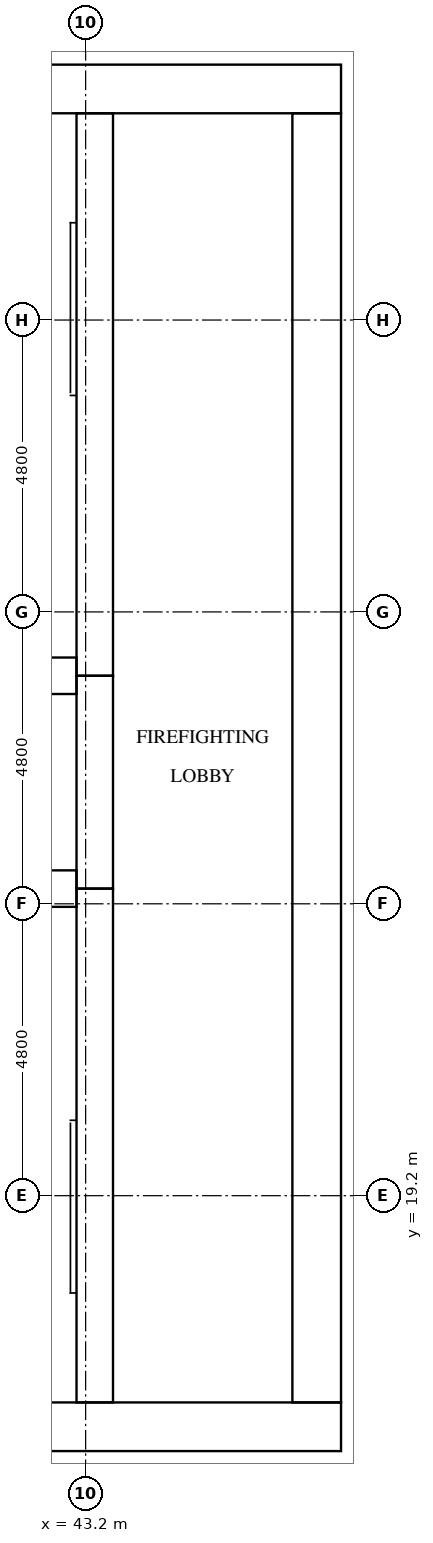
"""IFC4 building model, lengths in metres.
Left out: names, types, materials, properties, quantities, classifications, styles, units other than length and angle.
Written with IfcOpenShell. Run it as: python <this file> out.ifc"""

import sys

from ifc_helpers import new_model, si_unit, direction, frame, frame_2d, origin, place, context, subcontext, project, spatial, rectangle, extrude, element, fill, save


model = new_model("IFC4")
c1 = context("Model", 3, precision=1e-05, world=origin(), true_north=direction((0.0, 1.0)))
c2 = subcontext(c1, "Body", "Model", "MODEL_VIEW")
j1 = project(units=[si_unit("LENGTHUNIT", "METRE"), si_unit("PLANEANGLEUNIT", "RADIAN")], contexts=[c1])
p1 = place(None, origin())
s1 = spatial("IfcSite", under=j1, at=p1, CompositionType="ELEMENT")
p2 = place(p1, origin())
s2 = spatial("IfcBuilding", under=s1, at=p2, CompositionType="ELEMENT")
p3 = place(p2, frame((0.0, 0.0, 133.1)))
s3 = spatial("IfcBuildingStorey", under=s2, at=p3, CompositionType="ELEMENT", Elevation=133.1)
p4 = place(p3, frame((15.0, 15.4, 0.0), z_axis=(0.0, 0.0, 1.0), x_axis=(1.0, 0.0, 0.0)))
e1 = element("IfcWall", 1, at=p4, inside=s3, PredefinedType="SHEAR", context=c2, shape_type="SweptSolid", body=[
    extrude(rectangle(XDim=32.4, YDim=0.8, at=frame_2d((16.2, 0.0))), origin(), (0.0, 0.0, 1.0), 3.2),
])
p5 = place(p4, frame((15.3, 0.0, 0.0)))
e2 = element("IfcOpeningElement", 2, at=p5, cuts=e1, PredefinedType="OPENING", context=c2, shape_type="SweptSolid", body=[
    extrude(rectangle(XDim=1.8, YDim=2.1, at=frame_2d((0.9, 1.05))), frame((0.0, 0.41, 0.0), z_axis=(0.0, -1.0, 0.0), x_axis=(1.0, 0.0, 0.0)), (0.0, 0.0, 1.0), 0.82),
])
p6 = place(p3, frame((15.0, 37.4, 0.0), z_axis=(0.0, 0.0, 1.0), x_axis=(1.0, 0.0, 0.0)))
e3 = element("IfcWall", 3, at=p6, inside=s3, PredefinedType="SHEAR", context=c2, shape_type="SweptSolid", body=[
    extrude(rectangle(XDim=32.4, YDim=0.8, at=frame_2d((16.2, 0.0))), origin(), (0.0, 0.0, 1.0), 3.2),
])
p7 = place(p6, frame((15.3, 0.0, 0.0)))
e4 = element("IfcOpeningElement", 4, at=p7, cuts=e3, PredefinedType="OPENING", context=c2, shape_type="SweptSolid", body=[
    extrude(rectangle(XDim=1.8, YDim=2.1, at=frame_2d((0.9, 1.05))), frame((0.0, 0.41, 0.0), z_axis=(0.0, -1.0, 0.0), x_axis=(1.0, 0.0, 0.0)), (0.0, 0.0, 1.0), 0.82),
])
p8 = place(p6, frame((1.51, 0.0, 0.0)))
e5 = element("IfcOpeningElement", 5, at=p8, cuts=e3, PredefinedType="OPENING", context=c2, shape_type="SweptSolid", body=[
    extrude(rectangle(XDim=1.0, YDim=2.1, at=frame_2d((0.5, 1.05))), frame((0.0, 0.41, 0.0), z_axis=(0.0, -1.0, 0.0), x_axis=(1.0, 0.0, 0.0)), (0.0, 0.0, 1.0), 0.82),
])
p9 = place(p6, frame((5.11, 0.0, 0.0)))
e6 = element("IfcOpeningElement", 6, at=p9, cuts=e3, PredefinedType="OPENING", context=c2, shape_type="SweptSolid", body=[
    extrude(rectangle(XDim=1.0, YDim=2.1, at=frame_2d((0.5, 1.05))), frame((0.0, 0.41, 0.0), z_axis=(0.0, -1.0, 0.0), x_axis=(1.0, 0.0, 0.0)), (0.0, 0.0, 1.0), 0.82),
])
p10 = place(p3, frame((47.0, 15.8, 0.0), z_axis=(0.0, 0.0, 1.0), x_axis=(0.0, 1.0, 0.0)))
e7 = element("IfcWall", 7, at=p10, inside=s3, PredefinedType="SHEAR", context=c2, shape_type="SweptSolid", body=[
    extrude(rectangle(XDim=21.2, YDim=0.8, at=frame_2d((10.6, 0.0))), origin(), (0.0, 0.0, 1.0), 3.2),
])
p11 = place(p10, frame((10.3, 0.0, 0.0)))
e8 = element("IfcOpeningElement", 8, at=p11, cuts=e7, PredefinedType="OPENING", context=c2, shape_type="SweptSolid", body=[
    extrude(rectangle(XDim=1.2, YDim=2.1, at=frame_2d((0.6, 1.05))), frame((0.0, 0.41, 0.0), z_axis=(0.0, -1.0, 0.0), x_axis=(1.0, 0.0, 0.0)), (0.0, 0.0, 1.0), 0.82),
])
p12 = place(p3, frame((43.35, 15.8, 0.0), z_axis=(0.0, 0.0, 1.0), x_axis=(0.0, 1.0, 0.0)))
e9 = element("IfcWall", 9, at=p12, inside=s3, PredefinedType="SHEAR", context=c2, shape_type="SweptSolid", body=[
    extrude(rectangle(XDim=8.45, YDim=0.6, at=frame_2d((4.225, 0.0))), origin(), (0.0, 0.0, 1.0), 3.2),
])
p13 = place(p12, frame((0.4, 0.0, 0.0)))
e10 = element("IfcOpeningElement", 10, at=p13, cuts=e9, PredefinedType="OPENING", context=c2, shape_type="SweptSolid", body=[
    extrude(rectangle(XDim=1.2, YDim=2.1, at=frame_2d((0.6, 1.05))), frame((0.0, 0.31, 0.0), z_axis=(0.0, -1.0, 0.0), x_axis=(1.0, 0.0, 0.0)), (0.0, 0.0, 1.0), 0.62),
])
p14 = place(p3, frame((43.35, 24.25, 0.0), z_axis=(0.0, 0.0, 1.0), x_axis=(0.0, 1.0, 0.0)))
e11 = element("IfcWall", 11, at=p14, inside=s3, PredefinedType="SHEAR", context=c2, shape_type="SweptSolid", body=[
    extrude(rectangle(XDim=3.5, YDim=0.6, at=frame_2d((1.75, 0.0))), origin(), (0.0, 0.0, 1.0), 3.2),
])
p15 = place(p14, frame((1.2, 0.0, 0.0)))
e12 = element("IfcOpeningElement", 12, at=p15, cuts=e11, PredefinedType="OPENING", context=c2, shape_type="SweptSolid", body=[
    extrude(rectangle(XDim=1.1, YDim=2.1, at=frame_2d((0.55, 1.05))), frame((0.0, 0.31, 0.0), z_axis=(0.0, -1.0, 0.0), x_axis=(1.0, 0.0, 0.0)), (0.0, 0.0, 1.0), 0.62),
])
p16 = place(p3, frame((43.35, 27.75, 0.0), z_axis=(0.0, 0.0, 1.0), x_axis=(0.0, 1.0, 0.0)))
e13 = element("IfcWall", 13, at=p16, inside=s3, PredefinedType="SHEAR", context=c2, shape_type="SweptSolid", body=[
    extrude(rectangle(XDim=9.25, YDim=0.6, at=frame_2d((4.625, 0.0))), origin(), (0.0, 0.0, 1.0), 3.2),
])
p17 = place(p16, frame((7.65, 0.0, 0.0)))
e14 = element("IfcOpeningElement", 14, at=p17, cuts=e13, PredefinedType="OPENING", context=c2, shape_type="SweptSolid", body=[
    extrude(rectangle(XDim=1.2, YDim=2.1, at=frame_2d((0.6, 1.05))), frame((0.0, 0.31, 0.0), z_axis=(0.0, -1.0, 0.0), x_axis=(1.0, 0.0, 0.0)), (0.0, 0.0, 1.0), 0.62),
])
for number, where, z_axis, x_axis in (
    (15, (39.6, 24.25, 0.0), (0.0, 0.0, 1.0), (1.0, 0.0, 0.0)),
    (16, (39.6, 27.75, 0.0), (0.0, 0.0, 1.0), (1.0, 0.0, 0.0)),
):
    element("IfcWall", number, at=place(p3, frame(where, z_axis=z_axis, x_axis=x_axis)), inside=s3, PredefinedType="SHEAR", context=c2, shape_type="SweptSolid", body=[
        extrude(rectangle(XDim=3.45, YDim=0.6, at=frame_2d((1.725, 0.0))), origin(), (0.0, 0.0, 1.0), 3.2),
    ])
p18 = place(p15, origin())
e17 = element("IfcDoor", 17, at=p18, inside=s3, OperationType="DOUBLE_DOOR_SLIDING", PredefinedType="DOOR", context=c2, shape_type="SweptSolid", body=[
    extrude(rectangle(XDim=1.1, YDim=2.1, at=frame_2d((0.55, 1.05))), frame((0.0, 0.025, 0.0), z_axis=(0.0, -1.0, 0.0), x_axis=(1.0, 0.0, 0.0)), (0.0, 0.0, 1.0), 0.05),
])
fill(e12, e17)
p19 = place(p13, origin())
e18 = element("IfcDoor", 18, at=p19, inside=s3, OperationType="SINGLE_SWING_LEFT", PredefinedType="DOOR", context=c2, shape_type="SweptSolid", body=[
    extrude(rectangle(XDim=1.2, YDim=2.1, at=frame_2d((0.6, 1.05))), frame((0.0, 0.025, 0.0), z_axis=(0.0, -1.0, 0.0), x_axis=(1.0, 0.0, 0.0)), (0.0, 0.0, 1.0), 0.05),
])
fill(e10, e18)
p20 = place(p17, origin())
e19 = element("IfcDoor", 19, at=p20, inside=s3, OperationType="SINGLE_SWING_RIGHT", PredefinedType="DOOR", context=c2, shape_type="SweptSolid", body=[
    extrude(rectangle(XDim=1.2, YDim=2.1, at=frame_2d((0.6, 1.05))), frame((0.0, 0.025, 0.0), z_axis=(0.0, -1.0, 0.0), x_axis=(1.0, 0.0, 0.0)), (0.0, 0.0, 1.0), 0.05),
])
fill(e14, e19)
p21 = place(p11, origin())
e20 = element("IfcDoor", 20, at=p21, inside=s3, OperationType="SINGLE_SWING_RIGHT", PredefinedType="DOOR", context=c2, shape_type="SweptSolid", body=[
    extrude(rectangle(XDim=1.2, YDim=2.1, at=frame_2d((0.6, 1.05))), frame((0.0, 0.025, 0.0), z_axis=(0.0, -1.0, 0.0), x_axis=(1.0, 0.0, 0.0)), (0.0, 0.0, 1.0), 0.05),
])
fill(e8, e20)
save(model, sys.argv[1])
